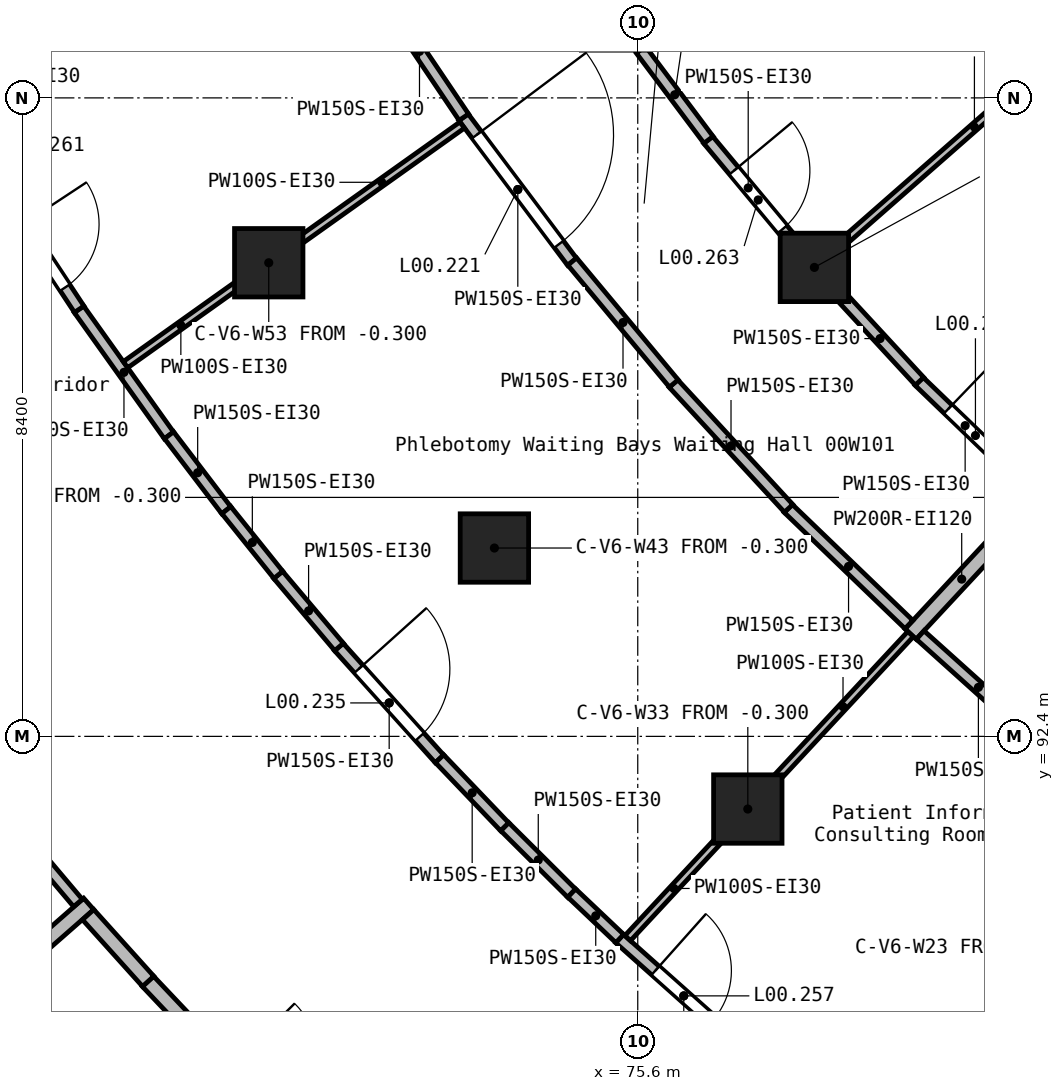
"""IFC4 building model, lengths in metres.
Left out: names, types, materials, properties, quantities, classifications, styles, units other than length and angle.
Written with IfcOpenShell. Run it as: python <this file> out.ifc"""

import sys

from ifc_helpers import new_model, si_unit, direction, frame, frame_2d, origin, origin_2d, place, context, subcontext, project, spatial, rectangle, extrude, element, fill, save


model = new_model("IFC4")
c1 = context("Model", 3, precision=1e-05, world=origin(), true_north=direction((0.0, 1.0)))
c2 = subcontext(c1, "Body", "Model", "MODEL_VIEW")
j1 = project(units=[si_unit("LENGTHUNIT", "METRE"), si_unit("PLANEANGLEUNIT", "RADIAN")], contexts=[c1])
p1 = place(None, origin())
s1 = spatial("IfcSite", under=j1, at=p1, CompositionType="ELEMENT")
p2 = place(p1, origin())
s2 = spatial("IfcBuilding", under=s1, at=p2, CompositionType="ELEMENT")
p3 = place(p2, origin())
s3 = spatial("IfcBuildingStorey", under=s2, at=p3, CompositionType="ELEMENT", Elevation=0.0)
for number, where, z_axis, x_axis in (
    (1, (70.745, 98.631, -0.3), (0.0, 0.0, 1.0), (1.0, 0.0, 0.0)),
    (2, (73.714, 94.878, -0.3), (0.0, 0.0, 1.0), (1.0, 0.0, 0.0)),
    (3, (77.048, 91.444, -0.3), (0.0, 0.0, 1.0), (1.0, 0.0, 0.0)),
    (4, (77.924, 98.57, -0.3), (0.0, 0.0, 1.0), (1.0, 0.0, 0.0)),
):
    element("IfcColumn", number, at=place(p3, frame(where, z_axis=z_axis, x_axis=x_axis)), inside=s3, PredefinedType="COLUMN", context=c2, shape_type="SweptSolid", body=[
        extrude(rectangle(XDim=0.9, YDim=0.9, at=origin_2d()), origin(), (0.0, 0.0, 1.0), 5.7),
    ])
p4 = place(p3, frame((66.869, 88.874, 0.0), z_axis=(0.0, 0.0, 1.0), x_axis=(0.751874567132, 0.659306177205, 0.0)))
e5 = element("IfcWall", 5, at=p4, inside=s3, PredefinedType="SOLIDWALL", context=c2, shape_type="SweptSolid", body=[
    extrude(rectangle(XDim=2.004, YDim=0.2, at=frame_2d((1.002, 0.0))), origin(), (0.0, 0.0, 1.0), 5.05),
])
p5 = place(p3, frame((79.19, 93.746, 0.0), z_axis=(0.0, 0.0, 1.0), x_axis=(0.681171780306, 0.732123627344, 0.0)))
e6 = element("IfcWall", 6, at=p5, inside=s3, PredefinedType="SOLIDWALL", context=c2, shape_type="SweptSolid", body=[
    extrude(rectangle(XDim=1.974, YDim=0.2, at=frame_2d((0.987, 0.0))), origin(), (0.0, 0.0, 1.0), 5.05),
])
p6 = place(p3, frame((69.155, 89.177, 0.0), z_axis=(0.0, 0.0, 1.0), x_axis=(0.687313254989, -0.726361128858, 0.0)))
e7 = element("IfcWall", 7, at=p6, inside=s3, PredefinedType="SOLIDWALL", context=c2, shape_type="SweptSolid", body=[
    extrude(rectangle(XDim=1.382, YDim=0.2, at=frame_2d((0.691, 0.0))), origin(), (0.0, 0.0, 1.0), 5.05),
])
p7 = place(p3, frame((68.369, 90.055, 0.0), z_axis=(0.0, 0.0, 1.0), x_axis=(0.669113274241, -0.74316043102, 0.0)))
e8 = element("IfcWall", 8, at=p7, inside=s3, PredefinedType="SOLIDWALL", context=c2, shape_type="SweptSolid", body=[
    extrude(rectangle(XDim=1.18, YDim=0.2, at=frame_2d((0.59, 0.0))), origin(), (0.0, 0.0, 1.0), 5.05),
])
p8 = place(p3, frame((73.307, 100.547, 0.0), z_axis=(0.0, 0.0, 1.0), x_axis=(0.600377090661, -0.799717043091, 0.0)))
e9 = element("IfcWall", 9, at=p8, inside=s3, PredefinedType="PARTITIONING", context=c2, shape_type="SweptSolid", body=[
    extrude(rectangle(XDim=2.382, YDim=0.15, at=frame_2d((1.191, 0.0))), origin(), (0.0, 0.0, 1.0), 5.05),
])
p9 = place(p8, frame((0.291, 0.0, 0.0)))
e10 = element("IfcOpeningElement", 10, at=p9, cuts=e9, PredefinedType="OPENING", context=c2, shape_type="SweptSolid", body=[
    extrude(rectangle(XDim=1.8, YDim=2.1, at=frame_2d((0.9, 1.05))), frame((0.0, 0.085, 0.0), z_axis=(0.0, -1.0, 0.0), x_axis=(1.0, 0.0, 0.0)), (0.0, 0.0, 1.0), 0.17),
])
p10 = place(p3, frame((77.579, 95.4, 0.0), z_axis=(0.0, 0.0, 1.0), x_axis=(0.720594722174, -0.693356507415, 0.0)))
e11 = element("IfcWall", 11, at=p10, inside=s3, PredefinedType="PARTITIONING", context=c2, shape_type="SweptSolid", body=[
    extrude(rectangle(XDim=2.205, YDim=0.15, at=frame_2d((1.103, 0.0))), origin(), (0.0, 0.0, 1.0), 5.05),
])
p11 = place(p3, frame((76.069, 97.043, 0.0), z_axis=(0.0, 0.0, 1.0), x_axis=(0.678030610295, -0.735033666918, 0.0)))
e12 = element("IfcWall", 12, at=p11, inside=s3, PredefinedType="PARTITIONING", context=c2, shape_type="SweptSolid", body=[
    extrude(rectangle(XDim=2.236, YDim=0.15, at=frame_2d((1.118, 0.0))), origin(), (0.0, 0.0, 1.0), 5.05),
])
p12 = place(p3, frame((79.316, 93.733, 0.0), z_axis=(0.0, 0.0, 1.0), x_axis=(0.74346507851, -0.668774758073, 0.0)))
e13 = element("IfcWall", 13, at=p12, inside=s3, PredefinedType="PARTITIONING", context=c2, shape_type="SweptSolid", body=[
    extrude(rectangle(XDim=2.059, YDim=0.15, at=frame_2d((1.03, 0.0))), origin(), (0.0, 0.0, 1.0), 5.05),
])
p13 = place(p3, frame((72.145, 102.278, 0.0), z_axis=(0.0, 0.0, 1.0), x_axis=(0.558900636953, -0.829234633873, 0.0)))
e14 = element("IfcWall", 14, at=p13, inside=s3, PredefinedType="PARTITIONING", context=c2, shape_type="SweptSolid", body=[
    extrude(rectangle(XDim=2.089, YDim=0.15, at=frame_2d((1.044, 0.0))), origin(), (0.0, 0.0, 1.0), 5.05),
])
p14 = place(p3, frame((74.738, 98.647, 0.0), z_axis=(0.0, 0.0, 1.0), x_axis=(0.640000381719, -0.768374590548, 0.0)))
e15 = element("IfcWall", 15, at=p14, inside=s3, PredefinedType="PARTITIONING", context=c2, shape_type="SweptSolid", body=[
    extrude(rectangle(XDim=2.088, YDim=0.15, at=frame_2d((1.044, 0.0))), origin(), (0.0, 0.0, 1.0), 5.05),
])
p15 = place(p3, frame((75.36, 89.74, 0.0), z_axis=(0.0, 0.0, 1.0), x_axis=(0.746361982095, -0.665540225443, 0.0)))
e16 = element("IfcWall", 16, at=p15, inside=s3, PredefinedType="PARTITIONING", context=c2, shape_type="SweptSolid", body=[
    extrude(rectangle(XDim=2.266, YDim=0.15, at=frame_2d((1.133, 0.0))), origin(), (0.0, 0.0, 1.0), 5.05),
])
p16 = place(p15, frame((0.633, 0.0, 0.0)))
e17 = element("IfcOpeningElement", 17, at=p16, cuts=e16, PredefinedType="OPENING", context=c2, shape_type="SweptSolid", body=[
    extrude(rectangle(XDim=1.0, YDim=2.1, at=frame_2d((0.5, 1.05))), frame((0.0, 0.085, 0.0), z_axis=(0.0, -1.0, 0.0), x_axis=(1.0, 0.0, 0.0)), (0.0, 0.0, 1.0), 0.17),
])
p17 = place(p3, frame((79.301, 97.072, 0.0), z_axis=(0.0, 0.0, 1.0), x_axis=(0.720465115712, -0.69349118022, 0.0)))
e18 = element("IfcWall", 18, at=p17, inside=s3, PredefinedType="PARTITIONING", context=c2, shape_type="SweptSolid", body=[
    extrude(rectangle(XDim=1.684, YDim=0.15, at=frame_2d((0.842, 0.0))), origin(), (0.0, 0.0, 1.0), 5.05),
])
p18 = place(p17, frame((0.53, 0.0, 0.0)))
e19 = element("IfcOpeningElement", 19, at=p18, cuts=e18, PredefinedType="OPENING", context=c2, shape_type="SweptSolid", body=[
    extrude(rectangle(XDim=1.0, YDim=2.1, at=frame_2d((0.5, 1.05))), frame((0.0, 0.085, 0.0), z_axis=(0.0, -1.0, 0.0), x_axis=(1.0, 0.0, 0.0)), (0.0, 0.0, 1.0), 0.17),
])
p19 = place(p3, frame((78.27, 98.195, 0.0), z_axis=(0.0, 0.0, 1.0), x_axis=(0.678273469528, -0.73480956753, 0.0)))
e20 = element("IfcWall", 20, at=p19, inside=s3, PredefinedType="PARTITIONING", context=c2, shape_type="SweptSolid", body=[
    extrude(rectangle(XDim=1.529, YDim=0.15, at=frame_2d((0.764, 0.0))), origin(), (0.0, 0.0, 1.0), 5.05),
])
p20 = place(p3, frame((76.526, 100.249, 0.0), z_axis=(0.0, 0.0, 1.0), x_axis=(0.640038659854, -0.768342706019, 0.0)))
e21 = element("IfcWall", 21, at=p20, inside=s3, PredefinedType="PARTITIONING", context=c2, shape_type="SweptSolid", body=[
    extrude(rectangle(XDim=1.648, YDim=0.15, at=frame_2d((0.824, 0.0))), origin(), (0.0, 0.0, 1.0), 5.05),
])
p21 = place(p20, frame((0.53, 0.0, 0.0)))
e22 = element("IfcOpeningElement", 22, at=p21, cuts=e21, PredefinedType="OPENING", context=c2, shape_type="SweptSolid", body=[
    extrude(rectangle(XDim=1.0, YDim=2.1, at=frame_2d((0.5, 1.05))), frame((0.0, 0.085, 0.0), z_axis=(0.0, -1.0, 0.0), x_axis=(1.0, 0.0, 0.0)), (0.0, 0.0, 1.0), 0.17),
])
p22 = place(p3, frame((75.641, 101.434, 0.0), z_axis=(0.0, 0.0, 1.0), x_axis=(0.60023710435, -0.799822116825, 0.0)))
e23 = element("IfcWall", 23, at=p22, inside=s3, PredefinedType="PARTITIONING", context=c2, shape_type="SweptSolid", body=[
    extrude(rectangle(XDim=1.483, YDim=0.15, at=frame_2d((0.741, 0.0))), origin(), (0.0, 0.0, 1.0), 5.05),
])
p23 = place(p3, frame((67.052, 91.609, 0.0), z_axis=(0.0, 0.0, 1.0), x_axis=(0.645369063346, -0.763870913228, 0.0)))
e24 = element("IfcWall", 24, at=p23, inside=s3, PredefinedType="PARTITIONING", context=c2, shape_type="SweptSolid", body=[
    extrude(rectangle(XDim=1.833, YDim=0.15, at=frame_2d((0.917, 0.0))), origin(), (0.0, 0.0, 1.0), 5.05),
])
p24 = place(p3, frame((68.247, 98.02, 0.0), z_axis=(0.0, 0.0, 1.0), x_axis=(0.580842026392, -0.81401630228, 0.0)))
e25 = element("IfcWall", 25, at=p24, inside=s3, PredefinedType="PARTITIONING", context=c2, shape_type="SweptSolid", body=[
    extrude(rectangle(XDim=2.041, YDim=0.15, at=frame_2d((1.021, 0.0))), origin(), (0.0, 0.0, 1.0), 5.05),
])
p25 = place(p3, frame((71.667, 93.577, 0.0), z_axis=(0.0, 0.0, 1.0), x_axis=(0.668733315137, -0.743502355898, 0.0)))
e26 = element("IfcWall", 26, at=p25, inside=s3, PredefinedType="PARTITIONING", context=c2, shape_type="SweptSolid", body=[
    extrude(rectangle(XDim=1.982, YDim=0.15, at=frame_2d((0.991, 0.0))), origin(), (0.0, 0.0, 1.0), 5.05),
])
p26 = place(p25, frame((0.391, 0.0, 0.0)))
e27 = element("IfcOpeningElement", 27, at=p26, cuts=e26, PredefinedType="OPENING", context=c2, shape_type="SweptSolid", body=[
    extrude(rectangle(XDim=1.2, YDim=2.1, at=frame_2d((0.6, 1.05))), frame((0.0, 0.085, 0.0), z_axis=(0.0, -1.0, 0.0), x_axis=(1.0, 0.0, 0.0)), (0.0, 0.0, 1.0), 0.17),
])
p27 = place(p3, frame((67.244, 99.547, 0.0), z_axis=(0.0, 0.0, 1.0), x_axis=(0.550660027371, -0.834729617454, 0.0)))
e28 = element("IfcWall", 28, at=p27, inside=s3, PredefinedType="PARTITIONING", context=c2, shape_type="SweptSolid", body=[
    extrude(rectangle(XDim=1.83, YDim=0.15, at=frame_2d((0.915, 0.0))), origin(), (0.0, 0.0, 1.0), 5.05),
])
p28 = place(p27, frame((0.489, 0.0, 0.0)))
e29 = element("IfcOpeningElement", 29, at=p28, cuts=e28, PredefinedType="OPENING", context=c2, shape_type="SweptSolid", body=[
    extrude(rectangle(XDim=1.0, YDim=2.1, at=frame_2d((0.5, 1.05))), frame((0.0, 0.085, 0.0), z_axis=(0.0, -1.0, 0.0), x_axis=(1.0, 0.0, 0.0)), (0.0, 0.0, 1.0), 0.17),
])
p29 = place(p3, frame((69.433, 96.362, 0.0), z_axis=(0.0, 0.0, 1.0), x_axis=(0.606457599152, -0.795115828311, 0.0)))
e30 = element("IfcWall", 30, at=p29, inside=s3, PredefinedType="PARTITIONING", context=c2, shape_type="SweptSolid", body=[
    extrude(rectangle(XDim=1.242, YDim=0.15, at=frame_2d((0.621, 0.0))), origin(), (0.0, 0.0, 1.0), 5.05),
])
p30 = place(p3, frame((72.992, 92.106, 0.0), z_axis=(0.0, 0.0, 1.0), x_axis=(0.691209259047, -0.72265466179, 0.0)))
e31 = element("IfcWall", 31, at=p30, inside=s3, PredefinedType="PARTITIONING", context=c2, shape_type="SweptSolid", body=[
    extrude(rectangle(XDim=1.242, YDim=0.15, at=frame_2d((0.621, 0.0))), origin(), (0.0, 0.0, 1.0), 5.05),
])
p31 = place(p3, frame((70.869, 94.525, 0.0), z_axis=(0.0, 0.0, 1.0), x_axis=(0.645236922374, -0.763982535144, 0.0)))
e32 = element("IfcWall", 32, at=p31, inside=s3, PredefinedType="PARTITIONING", context=c2, shape_type="SweptSolid", body=[
    extrude(rectangle(XDim=1.242, YDim=0.15, at=frame_2d((0.621, 0.0))), origin(), (0.0, 0.0, 1.0), 5.05),
])
p32 = place(p3, frame((73.851, 91.211, 0.0), z_axis=(0.0, 0.0, 1.0), x_axis=(0.709168733207, -0.70503879882, 0.0)))
e33 = element("IfcWall", 33, at=p32, inside=s3, PredefinedType="PARTITIONING", context=c2, shape_type="SweptSolid", body=[
    extrude(rectangle(XDim=1.241, YDim=0.15, at=frame_2d((0.621, 0.0))), origin(), (0.0, 0.0, 1.0), 5.05),
])
p33 = place(p3, frame((70.187, 95.377, 0.0), z_axis=(0.0, 0.0, 1.0), x_axis=(0.626301399266, -0.779581013928, 0.0)))
e34 = element("IfcWall", 34, at=p33, inside=s3, PredefinedType="PARTITIONING", context=c2, shape_type="SweptSolid", body=[
    extrude(rectangle(XDim=1.093, YDim=0.15, at=frame_2d((0.546, 0.0))), origin(), (0.0, 0.0, 1.0), 5.05),
])
p34 = place(p3, frame((74.731, 90.339, 0.0), z_axis=(0.0, 0.0, 1.0), x_axis=(0.725923200466, -0.687775767984, 0.0)))
e35 = element("IfcWall", 35, at=p34, inside=s3, PredefinedType="PARTITIONING", context=c2, shape_type="SweptSolid", body=[
    extrude(rectangle(XDim=0.87, YDim=0.15, at=frame_2d((0.435, 0.0))), origin(), (0.0, 0.0, 1.0), 5.05),
])
p35 = place(p3, frame((78.338, 98.933, 0.0), z_axis=(0.0, 0.0, 1.0), x_axis=(0.751823288541, 0.659364650863, 0.0)))
e36 = element("IfcWall", 36, at=p35, inside=s3, PredefinedType="PARTITIONING", context=c2, shape_type="SweptSolid", body=[
    extrude(rectangle(XDim=4.5, YDim=0.1, at=frame_2d((2.25, 0.0))), origin(), (0.0, 0.0, 1.0), 5.05),
])
p36 = place(p3, frame((75.468, 89.746, 0.0), z_axis=(0.0, 0.0, 1.0), x_axis=(0.681143154038, 0.732150260334, 0.0)))
e37 = element("IfcWall", 37, at=p36, inside=s3, PredefinedType="PARTITIONING", context=c2, shape_type="SweptSolid", body=[
    extrude(rectangle(XDim=1.785, YDim=0.1, at=frame_2d((0.893, 0.0))), origin(), (0.0, 0.0, 1.0), 5.05),
])
p37 = place(p3, frame((77.412, 91.835, 0.0), z_axis=(0.0, 0.0, 1.0), x_axis=(0.681147107729, 0.732146582067, 0.0)))
e38 = element("IfcWall", 38, at=p37, inside=s3, PredefinedType="PARTITIONING", context=c2, shape_type="SweptSolid", body=[
    extrude(rectangle(XDim=2.609, YDim=0.1, at=frame_2d((1.304, 0.0))), origin(), (0.0, 0.0, 1.0), 5.05),
])
p38 = place(p3, frame((68.861, 97.29, 0.0), z_axis=(0.0, 0.0, 1.0), x_axis=(0.814701484378, 0.5798805837, 0.0)))
e39 = element("IfcWall", 39, at=p38, inside=s3, PredefinedType="PARTITIONING", context=c2, shape_type="SweptSolid", body=[
    extrude(rectangle(XDim=1.787, YDim=0.1, at=frame_2d((0.894, 0.0))), origin(), (0.0, 0.0, 1.0), 5.05),
])
p39 = place(p3, frame((71.173, 98.936, 0.0), z_axis=(0.0, 0.0, 1.0), x_axis=(0.814672160951, 0.579921779355, 0.0)))
e40 = element("IfcWall", 40, at=p39, inside=s3, PredefinedType="PARTITIONING", context=c2, shape_type="SweptSolid", body=[
    extrude(rectangle(XDim=2.598, YDim=0.1, at=frame_2d((1.299, 0.0))), origin(), (0.0, 0.0, 1.0), 5.05),
])
p40 = place(p9, origin())
e41 = element("IfcDoor", 41, at=p40, inside=s3, OperationType="DOUBLE_DOOR_SINGLE_SWING", PredefinedType="DOOR", context=c2, shape_type="SweptSolid", body=[
    extrude(rectangle(XDim=1.8, YDim=2.1, at=frame_2d((0.9, 1.05))), frame((0.0, 0.025, 0.0), z_axis=(0.0, -1.0, 0.0), x_axis=(1.0, 0.0, 0.0)), (0.0, 0.0, 1.0), 0.05),
])
fill(e10, e41)
p41 = place(p26, frame((1.2, 0.0, 0.0), z_axis=(0.0, 0.0, 1.0), x_axis=(-1.0, 0.0, 0.0)))
e42 = element("IfcDoor", 42, at=p41, inside=s3, OperationType="SINGLE_SWING_RIGHT", PredefinedType="DOOR", context=c2, shape_type="SweptSolid", body=[
    extrude(rectangle(XDim=1.2, YDim=2.1, at=frame_2d((0.6, 1.05))), frame((0.0, 0.025, 0.0), z_axis=(0.0, -1.0, 0.0), x_axis=(1.0, 0.0, 0.0)), (0.0, 0.0, 1.0), 0.05),
])
fill(e27, e42)
p42 = place(p16, origin())
e43 = element("IfcDoor", 43, at=p42, inside=s3, OperationType="SINGLE_SWING_LEFT", PredefinedType="DOOR", context=c2, shape_type="SweptSolid", body=[
    extrude(rectangle(XDim=1.0, YDim=2.1, at=frame_2d((0.5, 1.05))), frame((0.0, 0.025, 0.0), z_axis=(0.0, -1.0, 0.0), x_axis=(1.0, 0.0, 0.0)), (0.0, 0.0, 1.0), 0.05),
])
fill(e17, e43)
p43 = place(p28, origin())
e44 = element("IfcDoor", 44, at=p43, inside=s3, OperationType="SINGLE_SWING_RIGHT", PredefinedType="DOOR", context=c2, shape_type="SweptSolid", body=[
    extrude(rectangle(XDim=1.0, YDim=2.1, at=frame_2d((0.5, 1.05))), frame((0.0, 0.025, 0.0), z_axis=(0.0, -1.0, 0.0), x_axis=(1.0, 0.0, 0.0)), (0.0, 0.0, 1.0), 0.05),
])
fill(e29, e44)
p44 = place(p18, origin())
e45 = element("IfcDoor", 45, at=p44, inside=s3, OperationType="SINGLE_SWING_RIGHT", PredefinedType="DOOR", context=c2, shape_type="SweptSolid", body=[
    extrude(rectangle(XDim=1.0, YDim=2.1, at=frame_2d((0.5, 1.05))), frame((0.0, 0.025, 0.0), z_axis=(0.0, -1.0, 0.0), x_axis=(1.0, 0.0, 0.0)), (0.0, 0.0, 1.0), 0.05),
])
fill(e19, e45)
p45 = place(p21, origin())
e46 = element("IfcDoor", 46, at=p45, inside=s3, OperationType="SINGLE_SWING_RIGHT", PredefinedType="DOOR", context=c2, shape_type="SweptSolid", body=[
    extrude(rectangle(XDim=1.0, YDim=2.1, at=frame_2d((0.5, 1.05))), frame((0.0, 0.025, 0.0), z_axis=(0.0, -1.0, 0.0), x_axis=(1.0, 0.0, 0.0)), (0.0, 0.0, 1.0), 0.05),
])
fill(e22, e46)
save(model, sys.argv[1])
